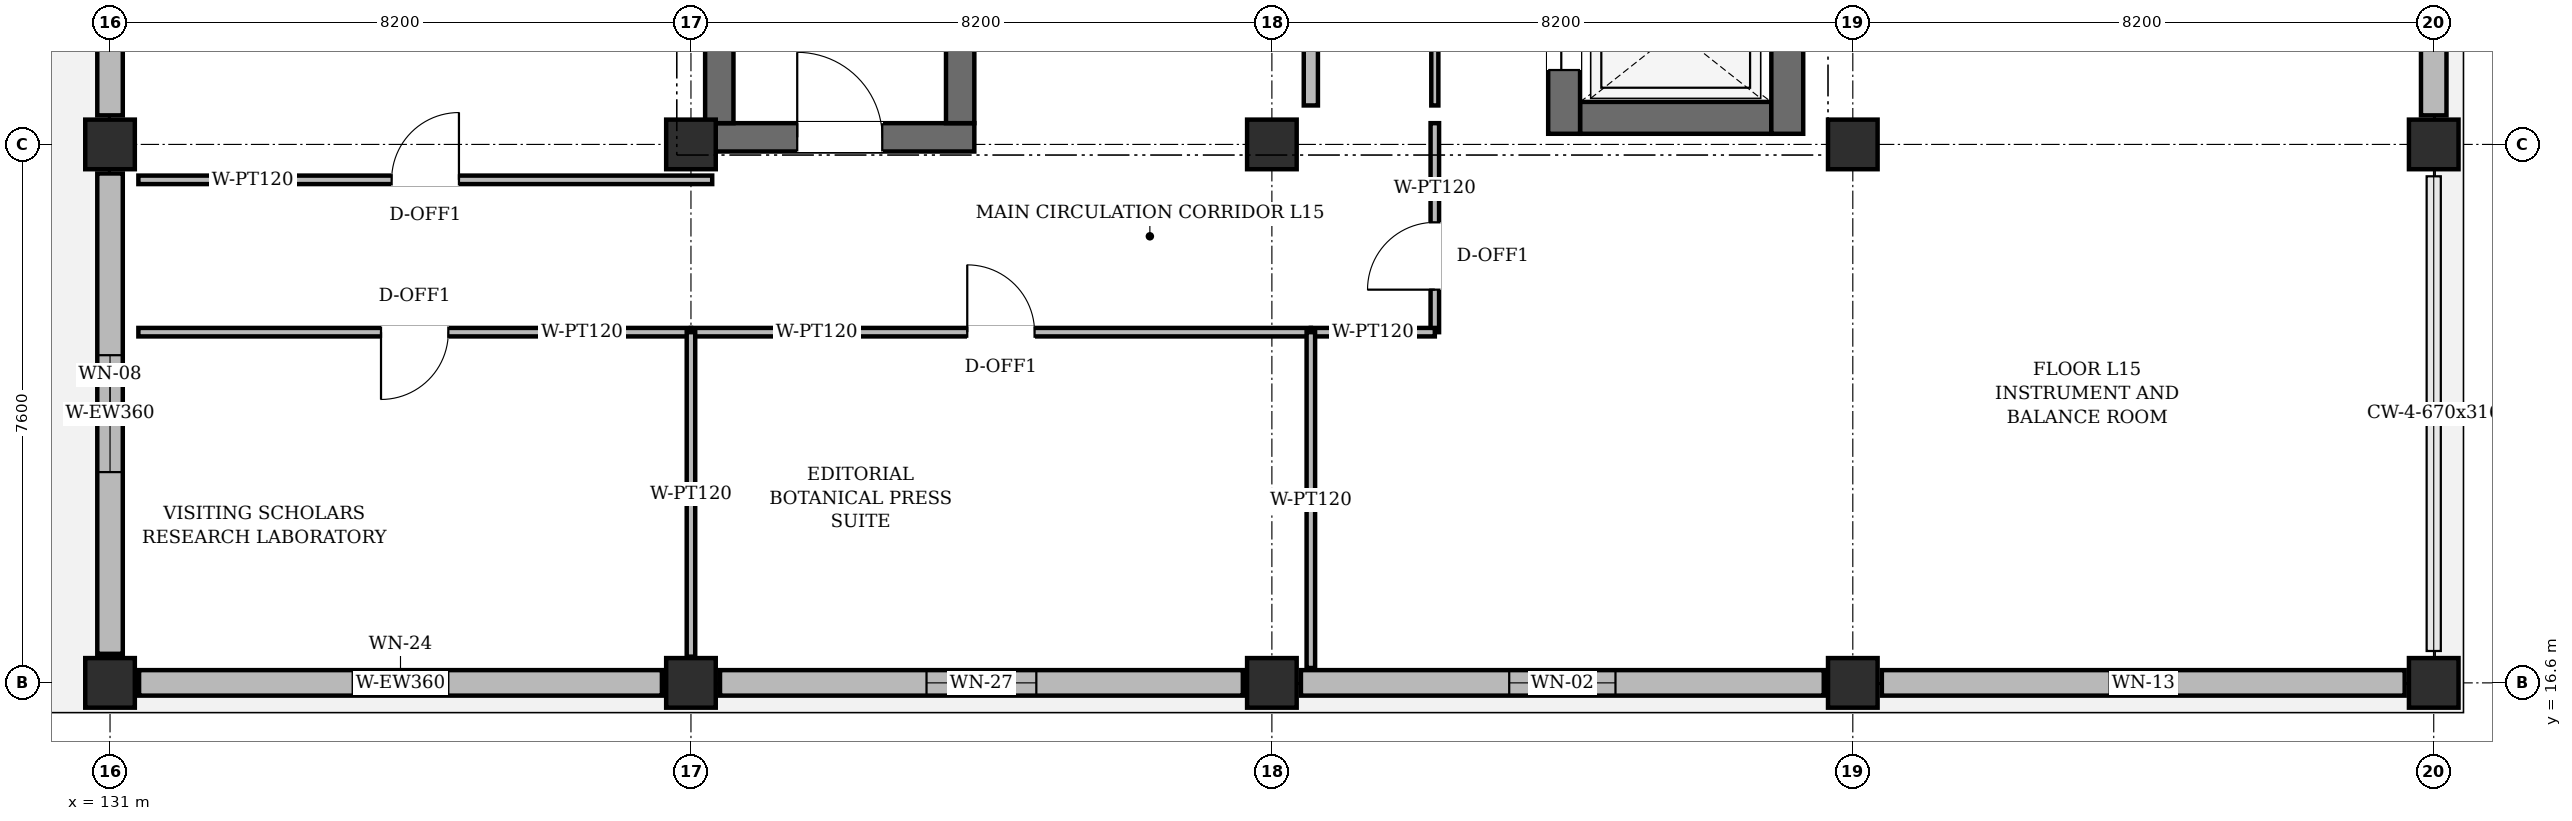
"""IFC4 building model, lengths in metres.
Left out: names, types, materials, properties, quantities, classifications, styles, units other than length and angle.
Written with IfcOpenShell. Run it as: python <this file> out.ifc"""

import sys

from ifc_helpers import new_model, si_unit, direction, frame, frame_2d, origin, origin_2d, place, context, subcontext, project, spatial, rectangle, extrude, element, fill, save


model = new_model("IFC4")
c1 = context("Model", 3, precision=1e-05, world=origin(), true_north=direction((0.0, 1.0)))
c2 = subcontext(c1, "Body", "Model", "MODEL_VIEW")
j1 = project(units=[si_unit("LENGTHUNIT", "METRE"), si_unit("PLANEANGLEUNIT", "RADIAN")], contexts=[c1])
p1 = place(None, origin())
s1 = spatial("IfcSite", under=j1, at=p1, CompositionType="ELEMENT")
p2 = place(p1, origin())
s2 = spatial("IfcBuilding", under=s1, at=p2, CompositionType="ELEMENT")
p3 = place(p2, frame((0.0, 0.0, 66.2)))
s3 = spatial("IfcBuildingStorey", under=s2, at=p3, CompositionType="ELEMENT", Elevation=66.2)
for number, where, z_axis, x_axis in (
    (1, (131.0, 16.6, 0.0), (0.0, 0.0, 1.0), (1.0, 0.0, 0.0)),
    (2, (131.0, 24.2, 0.0), (0.0, 0.0, 1.0), (1.0, 0.0, 0.0)),
    (3, (139.2, 16.6, 0.0), (0.0, 0.0, 1.0), (1.0, 0.0, 0.0)),
    (4, (139.2, 24.2, 0.0), (0.0, 0.0, 1.0), (1.0, 0.0, 0.0)),
    (5, (147.4, 16.6, 0.0), (0.0, 0.0, 1.0), (1.0, 0.0, 0.0)),
    (6, (147.4, 24.2, 0.0), (0.0, 0.0, 1.0), (1.0, 0.0, 0.0)),
    (7, (155.6, 16.6, 0.0), (0.0, 0.0, 1.0), (1.0, 0.0, 0.0)),
    (8, (155.6, 24.2, 0.0), (0.0, 0.0, 1.0), (1.0, 0.0, 0.0)),
    (9, (163.8, 16.6, 0.0), (0.0, 0.0, 1.0), (1.0, 0.0, 0.0)),
    (10, (163.8, 24.2, 0.0), (0.0, 0.0, 1.0), (1.0, 0.0, 0.0)),
):
    element("IfcColumn", number, at=place(p3, frame(where, z_axis=z_axis, x_axis=x_axis)), inside=s3, PredefinedType="COLUMN", context=c2, shape_type="SweptSolid", body=[
        extrude(rectangle(XDim=0.7, YDim=0.7, at=origin_2d()), origin(), (0.0, 0.0, 1.0), 3.76),
    ])
p4 = place(p3, frame((131.41, 16.6, 0.0), z_axis=(0.0, 0.0, 1.0), x_axis=(1.0, 0.0, 0.0)))
e11 = element("IfcWall", 11, at=p4, inside=s3, PredefinedType="SOLIDWALL", context=c2, shape_type="SweptSolid", body=[
    extrude(rectangle(XDim=7.38, YDim=0.36, at=frame_2d((3.69, 0.0))), origin(), (0.0, 0.0, 1.0), 3.145),
])
p5 = place(p4, frame((3.015, 0.0, 0.75)))
e12 = element("IfcOpeningElement", 12, at=p5, cuts=e11, PredefinedType="OPENING", context=c2, shape_type="SweptSolid", body=[
    extrude(rectangle(XDim=1.35, YDim=2.05, at=frame_2d((0.675, 1.025))), frame((0.0, 0.192, 0.0), z_axis=(0.0, -1.0, 0.0), x_axis=(1.0, 0.0, 0.0)), (0.0, 0.0, 1.0), 0.384),
])
p6 = place(p3, frame((139.61, 16.6, 0.0), z_axis=(0.0, 0.0, 1.0), x_axis=(1.0, 0.0, 0.0)))
e13 = element("IfcWall", 13, at=p6, inside=s3, PredefinedType="SOLIDWALL", context=c2, shape_type="SweptSolid", body=[
    extrude(rectangle(XDim=7.38, YDim=0.36, at=frame_2d((3.69, 0.0))), origin(), (0.0, 0.0, 1.0), 3.145),
])
p7 = place(p6, frame((2.915, 0.0, 0.95)))
e14 = element("IfcOpeningElement", 14, at=p7, cuts=e13, PredefinedType="OPENING", context=c2, shape_type="SweptSolid", body=[
    extrude(rectangle(XDim=1.55, YDim=1.75, at=frame_2d((0.775, 0.875))), frame((0.0, 0.192, 0.0), z_axis=(0.0, -1.0, 0.0), x_axis=(1.0, 0.0, 0.0)), (0.0, 0.0, 1.0), 0.384),
])
p8 = place(p3, frame((147.81, 16.6, 0.0), z_axis=(0.0, 0.0, 1.0), x_axis=(1.0, 0.0, 0.0)))
e15 = element("IfcWall", 15, at=p8, inside=s3, PredefinedType="SOLIDWALL", context=c2, shape_type="SweptSolid", body=[
    extrude(rectangle(XDim=7.38, YDim=0.36, at=frame_2d((3.69, 0.0))), origin(), (0.0, 0.0, 1.0), 3.145),
])
p9 = place(p8, frame((2.94, 0.0, 0.75)))
e16 = element("IfcOpeningElement", 16, at=p9, cuts=e15, PredefinedType="OPENING", context=c2, shape_type="SweptSolid", body=[
    extrude(rectangle(XDim=1.5, YDim=2.1, at=frame_2d((0.75, 1.05))), frame((0.0, 0.192, 0.0), z_axis=(0.0, -1.0, 0.0), x_axis=(1.0, 0.0, 0.0)), (0.0, 0.0, 1.0), 0.384),
])
p10 = place(p3, frame((156.01, 16.6, 0.0), z_axis=(0.0, 0.0, 1.0), x_axis=(1.0, 0.0, 0.0)))
e17 = element("IfcWall", 17, at=p10, inside=s3, PredefinedType="SOLIDWALL", context=c2, shape_type="SweptSolid", body=[
    extrude(rectangle(XDim=7.38, YDim=0.36, at=frame_2d((3.69, 0.0))), origin(), (0.0, 0.0, 1.0), 3.145),
])
p11 = place(p10, frame((3.215, 0.0, 0.95)))
e18 = element("IfcOpeningElement", 18, at=p11, cuts=e17, PredefinedType="OPENING", context=c2, shape_type="SweptSolid", body=[
    extrude(rectangle(XDim=0.95, YDim=1.25, at=frame_2d((0.475, 0.625))), frame((0.0, 0.192, 0.0), z_axis=(0.0, -1.0, 0.0), x_axis=(1.0, 0.0, 0.0)), (0.0, 0.0, 1.0), 0.384),
])
p12 = place(p3, frame((163.8, 24.61, 0.0), z_axis=(0.0, 0.0, 1.0), x_axis=(0.0, 1.0, 0.0)))
e19 = element("IfcWall", 19, at=p12, inside=s3, PredefinedType="SOLIDWALL", context=c2, shape_type="SweptSolid", body=[
    extrude(rectangle(XDim=6.78, YDim=0.36, at=frame_2d((3.39, 0.0))), origin(), (0.0, 0.0, 1.0), 3.145),
])
p13 = place(p12, frame((2.615, 0.0, 0.75)))
e20 = element("IfcOpeningElement", 20, at=p13, cuts=e19, PredefinedType="OPENING", context=c2, shape_type="SweptSolid", body=[
    extrude(rectangle(XDim=1.55, YDim=2.05, at=frame_2d((0.775, 1.025))), frame((0.0, 0.192, 0.0), z_axis=(0.0, -1.0, 0.0), x_axis=(1.0, 0.0, 0.0)), (0.0, 0.0, 1.0), 0.384),
])
p14 = place(p3, frame((131.0, 31.39, 0.0), z_axis=(0.0, 0.0, 1.0), x_axis=(0.0, -1.0, 0.0)))
e21 = element("IfcWall", 21, at=p14, inside=s3, PredefinedType="SOLIDWALL", context=c2, shape_type="SweptSolid", body=[
    extrude(rectangle(XDim=6.78, YDim=0.36, at=frame_2d((3.39, 0.0))), origin(), (0.0, 0.0, 1.0), 3.145),
])
p15 = place(p14, frame((2.94, 0.0, 0.75)))
e22 = element("IfcOpeningElement", 22, at=p15, cuts=e21, PredefinedType="OPENING", context=c2, shape_type="SweptSolid", body=[
    extrude(rectangle(XDim=0.9, YDim=2.1, at=frame_2d((0.45, 1.05))), frame((0.0, 0.192, 0.0), z_axis=(0.0, -1.0, 0.0), x_axis=(1.0, 0.0, 0.0)), (0.0, 0.0, 1.0), 0.384),
])
p16 = place(p3, frame((131.0, 23.79, 0.0), z_axis=(0.0, 0.0, 1.0), x_axis=(0.0, -1.0, 0.0)))
e23 = element("IfcWall", 23, at=p16, inside=s3, PredefinedType="SOLIDWALL", context=c2, shape_type="SweptSolid", body=[
    extrude(rectangle(XDim=6.78, YDim=0.36, at=frame_2d((3.39, 0.0))), origin(), (0.0, 0.0, 1.0), 3.145),
])
p17 = place(p16, frame((2.565, 0.0, 0.75)))
e24 = element("IfcOpeningElement", 24, at=p17, cuts=e23, PredefinedType="OPENING", context=c2, shape_type="SweptSolid", body=[
    extrude(rectangle(XDim=1.65, YDim=2.0, at=frame_2d((0.825, 1.0))), frame((0.0, 0.192, 0.0), z_axis=(0.0, -1.0, 0.0), x_axis=(1.0, 0.0, 0.0)), (0.0, 0.0, 1.0), 0.384),
])
p18 = place(p3, frame((139.4, 24.3, 0.0), z_axis=(0.0, 0.0, 1.0), x_axis=(1.0, 0.0, 0.0)))
e25 = element("IfcWall", 25, at=p18, inside=s3, PredefinedType="SHEAR", context=c2, shape_type="SweptSolid", body=[
    extrude(rectangle(XDim=3.8, YDim=0.4, at=frame_2d((1.9, 0.0))), origin(), (0.0, 0.0, 1.0), 3.76),
])
p19 = place(p18, frame((1.3, 0.0, 0.0)))
e26 = element("IfcOpeningElement", 26, at=p19, cuts=e25, PredefinedType="OPENING", context=c2, shape_type="SweptSolid", body=[
    extrude(rectangle(XDim=1.2, YDim=2.2, at=frame_2d((0.6, 1.1))), frame((0.0, 0.212, 0.0), z_axis=(0.0, -1.0, 0.0), x_axis=(1.0, 0.0, 0.0)), (0.0, 0.0, 1.0), 0.424),
])
for number, where, z_axis, x_axis in (
    (27, (139.6, 24.5, 0.0), (0.0, 0.0, 1.0), (0.0, 1.0, 0.0)),
    (28, (143.0, 24.5, 0.0), (0.0, 0.0, 1.0), (0.0, 1.0, 0.0)),
):
    element("IfcWall", number, at=place(p3, frame(where, z_axis=z_axis, x_axis=x_axis)), inside=s3, PredefinedType="SHEAR", context=c2, shape_type="SweptSolid", body=[
        extrude(rectangle(XDim=7.0, YDim=0.4, at=frame_2d((3.5, 0.0))), origin(), (0.0, 0.0, 1.0), 3.76),
    ])
p20 = place(p3, frame((151.75, 24.575, 0.0), z_axis=(0.0, 0.0, 1.0), x_axis=(1.0, 0.0, 0.0)))
e29 = element("IfcWall", 29, at=p20, inside=s3, PredefinedType="SHEAR", context=c2, shape_type="SweptSolid", body=[
    extrude(rectangle(XDim=2.7, YDim=0.45, at=frame_2d((1.35, 0.0))), origin(), (0.0, 0.0, 1.0), 3.76),
])
p21 = place(p3, frame((151.525, 24.35, 0.0), z_axis=(0.0, 0.0, 1.0), x_axis=(0.0, 1.0, 0.0)))
e30 = element("IfcWall", 30, at=p21, inside=s3, PredefinedType="SHEAR", context=c2, shape_type="SweptSolid", body=[
    extrude(rectangle(XDim=2.9, YDim=0.45, at=frame_2d((1.45, 0.0))), origin(), (0.0, 0.0, 1.0), 3.76),
])
p22 = place(p21, frame((0.9, 0.0, 0.0)))
e31 = element("IfcOpeningElement", 31, at=p22, cuts=e30, PredefinedType="OPENING", context=c2, shape_type="SweptSolid", body=[
    extrude(rectangle(XDim=1.1, YDim=2.2, at=frame_2d((0.55, 1.1))), frame((0.0, 0.237, 0.0), z_axis=(0.0, -1.0, 0.0), x_axis=(1.0, 0.0, 0.0)), (0.0, 0.0, 1.0), 0.474),
])
p23 = place(p3, frame((154.675, 24.35, 0.0), z_axis=(0.0, 0.0, 1.0), x_axis=(0.0, 1.0, 0.0)))
e32 = element("IfcWall", 32, at=p23, inside=s3, PredefinedType="SHEAR", context=c2, shape_type="SweptSolid", body=[
    extrude(rectangle(XDim=2.9, YDim=0.45, at=frame_2d((1.45, 0.0))), origin(), (0.0, 0.0, 1.0), 3.76),
])
p24 = place(p3, frame((147.95, 31.75, 0.0), z_axis=(0.0, 0.0, 1.0), x_axis=(0.0, -1.0, 0.0)))
e33 = element("IfcWall", 33, at=p24, inside=s3, PredefinedType="PARTITIONING", context=c2, shape_type="SweptSolid", body=[
    extrude(rectangle(XDim=7.0, YDim=0.2, at=frame_2d((3.5, 0.0))), origin(), (0.0, 0.0, 1.0), 3.605),
])
p25 = place(p24, frame((2.75, 0.0, 0.0)))
e34 = element("IfcOpeningElement", 34, at=p25, cuts=e33, PredefinedType="OPENING", context=c2, shape_type="SweptSolid", body=[
    extrude(rectangle(XDim=1.5, YDim=2.2, at=frame_2d((0.75, 1.1))), frame((0.0, 0.112, 0.0), z_axis=(0.0, -1.0, 0.0), x_axis=(1.0, 0.0, 0.0)), (0.0, 0.0, 1.0), 0.224),
])
p26 = place(p3, frame((149.7, 24.75, 0.0), z_axis=(0.0, 0.0, 1.0), x_axis=(0.0, 1.0, 0.0)))
e35 = element("IfcWall", 35, at=p26, inside=s3, PredefinedType="PARTITIONING", context=c2, shape_type="SweptSolid", body=[
    extrude(rectangle(XDim=11.3, YDim=0.1, at=frame_2d((5.65, 0.0))), origin(), (0.0, 0.0, 1.0), 3.605),
])
p27 = place(p26, frame((4.75, 0.0, 0.0)))
e36 = element("IfcOpeningElement", 36, at=p27, cuts=e35, PredefinedType="OPENING", context=c2, shape_type="SweptSolid", body=[
    extrude(rectangle(XDim=1.8, YDim=2.4, at=frame_2d((0.9, 1.2))), frame((0.0, 0.062, 0.0), z_axis=(0.0, -1.0, 0.0), x_axis=(1.0, 0.0, 0.0)), (0.0, 0.0, 1.0), 0.124),
])
p28 = place(p3, frame((139.2, 21.55, 0.0), z_axis=(0.0, 0.0, 1.0), x_axis=(-1.0, 0.0, 0.0)))
e37 = element("IfcWall", 37, at=p28, inside=s3, PredefinedType="PARTITIONING", context=c2, shape_type="SweptSolid", body=[
    extrude(rectangle(XDim=7.8, YDim=0.12, at=frame_2d((3.9, 0.0))), origin(), (0.0, 0.0, 1.0), 3.405),
])
p29 = place(p28, frame((3.425, 0.0, 0.0)))
e38 = element("IfcOpeningElement", 38, at=p29, cuts=e37, PredefinedType="OPENING", context=c2, shape_type="SweptSolid", body=[
    extrude(rectangle(XDim=0.95, YDim=2.2, at=frame_2d((0.475, 1.1))), frame((0.0, 0.072, 0.0), z_axis=(0.0, -1.0, 0.0), x_axis=(1.0, 0.0, 0.0)), (0.0, 0.0, 1.0), 0.144),
])
p30 = place(p3, frame((147.95, 21.55, 0.0), z_axis=(0.0, 0.0, 1.0), x_axis=(-1.0, 0.0, 0.0)))
e39 = element("IfcWall", 39, at=p30, inside=s3, PredefinedType="PARTITIONING", context=c2, shape_type="SweptSolid", body=[
    extrude(rectangle(XDim=8.75, YDim=0.12, at=frame_2d((4.375, 0.0))), origin(), (0.0, 0.0, 1.0), 3.335),
])
p31 = place(p30, frame((3.9, 0.0, 0.0)))
e40 = element("IfcOpeningElement", 40, at=p31, cuts=e39, PredefinedType="OPENING", context=c2, shape_type="SweptSolid", body=[
    extrude(rectangle(XDim=0.95, YDim=2.2, at=frame_2d((0.475, 1.1))), frame((0.0, 0.072, 0.0), z_axis=(0.0, -1.0, 0.0), x_axis=(1.0, 0.0, 0.0)), (0.0, 0.0, 1.0), 0.144),
])
p32 = place(p3, frame((131.4, 23.7, 0.0), z_axis=(0.0, 0.0, 1.0), x_axis=(1.0, 0.0, 0.0)))
e41 = element("IfcWall", 41, at=p32, inside=s3, PredefinedType="PARTITIONING", context=c2, shape_type="SweptSolid", body=[
    extrude(rectangle(XDim=8.1, YDim=0.12, at=frame_2d((4.05, 0.0))), origin(), (0.0, 0.0, 1.0), 3.605),
])
p33 = place(p32, frame((3.575, 0.0, 0.0)))
e42 = element("IfcOpeningElement", 42, at=p33, cuts=e41, PredefinedType="OPENING", context=c2, shape_type="SweptSolid", body=[
    extrude(rectangle(XDim=0.95, YDim=2.2, at=frame_2d((0.475, 1.1))), frame((0.0, 0.072, 0.0), z_axis=(0.0, -1.0, 0.0), x_axis=(1.0, 0.0, 0.0)), (0.0, 0.0, 1.0), 0.144),
])
p34 = place(p3, frame((149.7, 24.5, 0.0), z_axis=(0.0, 0.0, 1.0), x_axis=(0.0, -1.0, 0.0)))
e43 = element("IfcWall", 43, at=p34, inside=s3, PredefinedType="PARTITIONING", context=c2, shape_type="SweptSolid", body=[
    extrude(rectangle(XDim=0.8, YDim=0.12, at=frame_2d((0.4, 0.0))), origin(), (0.0, 0.0, 1.0), 3.605),
])
p35 = place(p3, frame((149.7, 23.7, 0.0), z_axis=(0.0, 0.0, 1.0), x_axis=(0.0, -1.0, 0.0)))
e44 = element("IfcWall", 44, at=p35, inside=s3, PredefinedType="PARTITIONING", context=c2, shape_type="SweptSolid", body=[
    extrude(rectangle(XDim=2.15, YDim=0.12, at=frame_2d((1.075, 0.0))), origin(), (0.0, 0.0, 1.0), 3.605),
])
p36 = place(p35, frame((0.6, 0.0, 0.0)))
e45 = element("IfcOpeningElement", 45, at=p36, cuts=e44, PredefinedType="OPENING", context=c2, shape_type="SweptSolid", body=[
    extrude(rectangle(XDim=0.95, YDim=2.2, at=frame_2d((0.475, 1.1))), frame((0.0, 0.072, 0.0), z_axis=(0.0, -1.0, 0.0), x_axis=(1.0, 0.0, 0.0)), (0.0, 0.0, 1.0), 0.144),
])
p37 = place(p3, frame((149.7, 21.55, 0.0), z_axis=(0.0, 0.0, 1.0), x_axis=(-1.0, 0.0, 0.0)))
e46 = element("IfcWall", 46, at=p37, inside=s3, PredefinedType="PARTITIONING", context=c2, shape_type="SweptSolid", body=[
    extrude(rectangle(XDim=1.75, YDim=0.12, at=frame_2d((0.875, 0.0))), origin(), (0.0, 0.0, 1.0), 3.335),
])
p38 = place(p3, frame((139.2, 21.55, 0.0), z_axis=(0.0, 0.0, 1.0), x_axis=(0.0, -1.0, 0.0)))
e47 = element("IfcWall", 47, at=p38, inside=s3, PredefinedType="PARTITIONING", context=c2, shape_type="SweptSolid", body=[
    extrude(rectangle(XDim=4.58, YDim=0.12, at=frame_2d((2.29, 0.0))), origin(), (0.0, 0.0, 1.0), 3.095),
])
p39 = place(p3, frame((147.95, 21.55, 0.0), z_axis=(0.0, 0.0, 1.0), x_axis=(0.0, -1.0, 0.0)))
e48 = element("IfcWall", 48, at=p39, inside=s3, PredefinedType="PARTITIONING", context=c2, shape_type="SweptSolid", body=[
    extrude(rectangle(XDim=4.74, YDim=0.12, at=frame_2d((2.37, 0.0))), origin(), (0.0, 0.0, 1.0), 3.605),
])
p40 = place(p5, origin())
e49 = element("IfcWindow", 49, at=p40, inside=s3, PartitioningType="SINGLE_PANEL", PredefinedType="WINDOW", context=c2, shape_type="SweptSolid", body=[
    extrude(rectangle(XDim=1.35, YDim=2.05, at=frame_2d((0.675, 1.025))), frame((0.0, 0.03, 0.0), z_axis=(0.0, -1.0, 0.0), x_axis=(1.0, 0.0, 0.0)), (0.0, 0.0, 1.0), 0.06),
])
fill(e12, e49)
p41 = place(p7, origin())
e50 = element("IfcWindow", 50, at=p41, inside=s3, PartitioningType="DOUBLE_PANEL_VERTICAL", PredefinedType="WINDOW", context=c2, shape_type="SweptSolid", body=[
    extrude(rectangle(XDim=1.55, YDim=1.75, at=frame_2d((0.775, 0.875))), frame((0.0, 0.03, 0.0), z_axis=(0.0, -1.0, 0.0), x_axis=(1.0, 0.0, 0.0)), (0.0, 0.0, 1.0), 0.06),
])
fill(e14, e50)
p42 = place(p9, origin())
e51 = element("IfcWindow", 51, at=p42, inside=s3, PartitioningType="DOUBLE_PANEL_VERTICAL", PredefinedType="WINDOW", context=c2, shape_type="SweptSolid", body=[
    extrude(rectangle(XDim=1.5, YDim=2.1, at=frame_2d((0.75, 1.05))), frame((0.0, 0.03, 0.0), z_axis=(0.0, -1.0, 0.0), x_axis=(1.0, 0.0, 0.0)), (0.0, 0.0, 1.0), 0.06),
])
fill(e16, e51)
p43 = place(p11, origin())
e52 = element("IfcWindow", 52, at=p43, inside=s3, PartitioningType="SINGLE_PANEL", PredefinedType="WINDOW", context=c2, shape_type="SweptSolid", body=[
    extrude(rectangle(XDim=0.95, YDim=1.25, at=frame_2d((0.475, 0.625))), frame((0.0, 0.03, 0.0), z_axis=(0.0, -1.0, 0.0), x_axis=(1.0, 0.0, 0.0)), (0.0, 0.0, 1.0), 0.06),
])
fill(e18, e52)
p44 = place(p17, origin())
e53 = element("IfcWindow", 53, at=p44, inside=s3, PartitioningType="DOUBLE_PANEL_VERTICAL", PredefinedType="WINDOW", context=c2, shape_type="SweptSolid", body=[
    extrude(rectangle(XDim=1.65, YDim=2.0, at=frame_2d((0.825, 1.0))), frame((0.0, 0.03, 0.0), z_axis=(0.0, -1.0, 0.0), x_axis=(1.0, 0.0, 0.0)), (0.0, 0.0, 1.0), 0.06),
])
fill(e24, e53)
p45 = place(p19, origin())
e54 = element("IfcDoor", 54, at=p45, inside=s3, OperationType="SINGLE_SWING_LEFT", PredefinedType="DOOR", context=c2, shape_type="SweptSolid", body=[
    extrude(rectangle(XDim=1.2, YDim=2.2, at=frame_2d((0.6, 1.1))), frame((0.0, 0.025, 0.0), z_axis=(0.0, -1.0, 0.0), x_axis=(1.0, 0.0, 0.0)), (0.0, 0.0, 1.0), 0.05),
])
fill(e26, e54)
p46 = place(p22, origin())
e55 = element("IfcDoor", 55, at=p46, inside=s3, OperationType="DOUBLE_DOOR_SLIDING", PredefinedType="DOOR", context=c2, shape_type="SweptSolid", body=[
    extrude(rectangle(XDim=1.1, YDim=2.2, at=frame_2d((0.55, 1.1))), frame((0.0, 0.025, 0.0), z_axis=(0.0, -1.0, 0.0), x_axis=(1.0, 0.0, 0.0)), (0.0, 0.0, 1.0), 0.05),
])
fill(e31, e55)
p47 = place(p29, origin())
e56 = element("IfcDoor", 56, at=p47, inside=s3, OperationType="SINGLE_SWING_RIGHT", PredefinedType="DOOR", context=c2, shape_type="SweptSolid", body=[
    extrude(rectangle(XDim=0.95, YDim=2.2, at=frame_2d((0.475, 1.1))), frame((0.0, 0.025, 0.0), z_axis=(0.0, -1.0, 0.0), x_axis=(1.0, 0.0, 0.0)), (0.0, 0.0, 1.0), 0.05),
])
fill(e38, e56)
p48 = place(p31, frame((0.95, 0.0, 0.0), z_axis=(0.0, 0.0, 1.0), x_axis=(-1.0, 0.0, 0.0)))
e57 = element("IfcDoor", 57, at=p48, inside=s3, OperationType="SINGLE_SWING_LEFT", PredefinedType="DOOR", context=c2, shape_type="SweptSolid", body=[
    extrude(rectangle(XDim=0.95, YDim=2.2, at=frame_2d((0.475, 1.1))), frame((0.0, 0.025, 0.0), z_axis=(0.0, -1.0, 0.0), x_axis=(1.0, 0.0, 0.0)), (0.0, 0.0, 1.0), 0.05),
])
fill(e40, e57)
p49 = place(p33, origin())
e58 = element("IfcDoor", 58, at=p49, inside=s3, OperationType="SINGLE_SWING_RIGHT", PredefinedType="DOOR", context=c2, shape_type="SweptSolid", body=[
    extrude(rectangle(XDim=0.95, YDim=2.2, at=frame_2d((0.475, 1.1))), frame((0.0, 0.025, 0.0), z_axis=(0.0, -1.0, 0.0), x_axis=(1.0, 0.0, 0.0)), (0.0, 0.0, 1.0), 0.05),
])
fill(e42, e58)
p50 = place(p36, frame((0.95, 0.0, 0.0), z_axis=(0.0, 0.0, 1.0), x_axis=(-1.0, 0.0, 0.0)))
e59 = element("IfcDoor", 59, at=p50, inside=s3, OperationType="SINGLE_SWING_LEFT", PredefinedType="DOOR", context=c2, shape_type="SweptSolid", body=[
    extrude(rectangle(XDim=0.95, YDim=2.2, at=frame_2d((0.475, 1.1))), frame((0.0, 0.025, 0.0), z_axis=(0.0, -1.0, 0.0), x_axis=(1.0, 0.0, 0.0)), (0.0, 0.0, 1.0), 0.05),
])
fill(e45, e59)
save(model, sys.argv[1])
